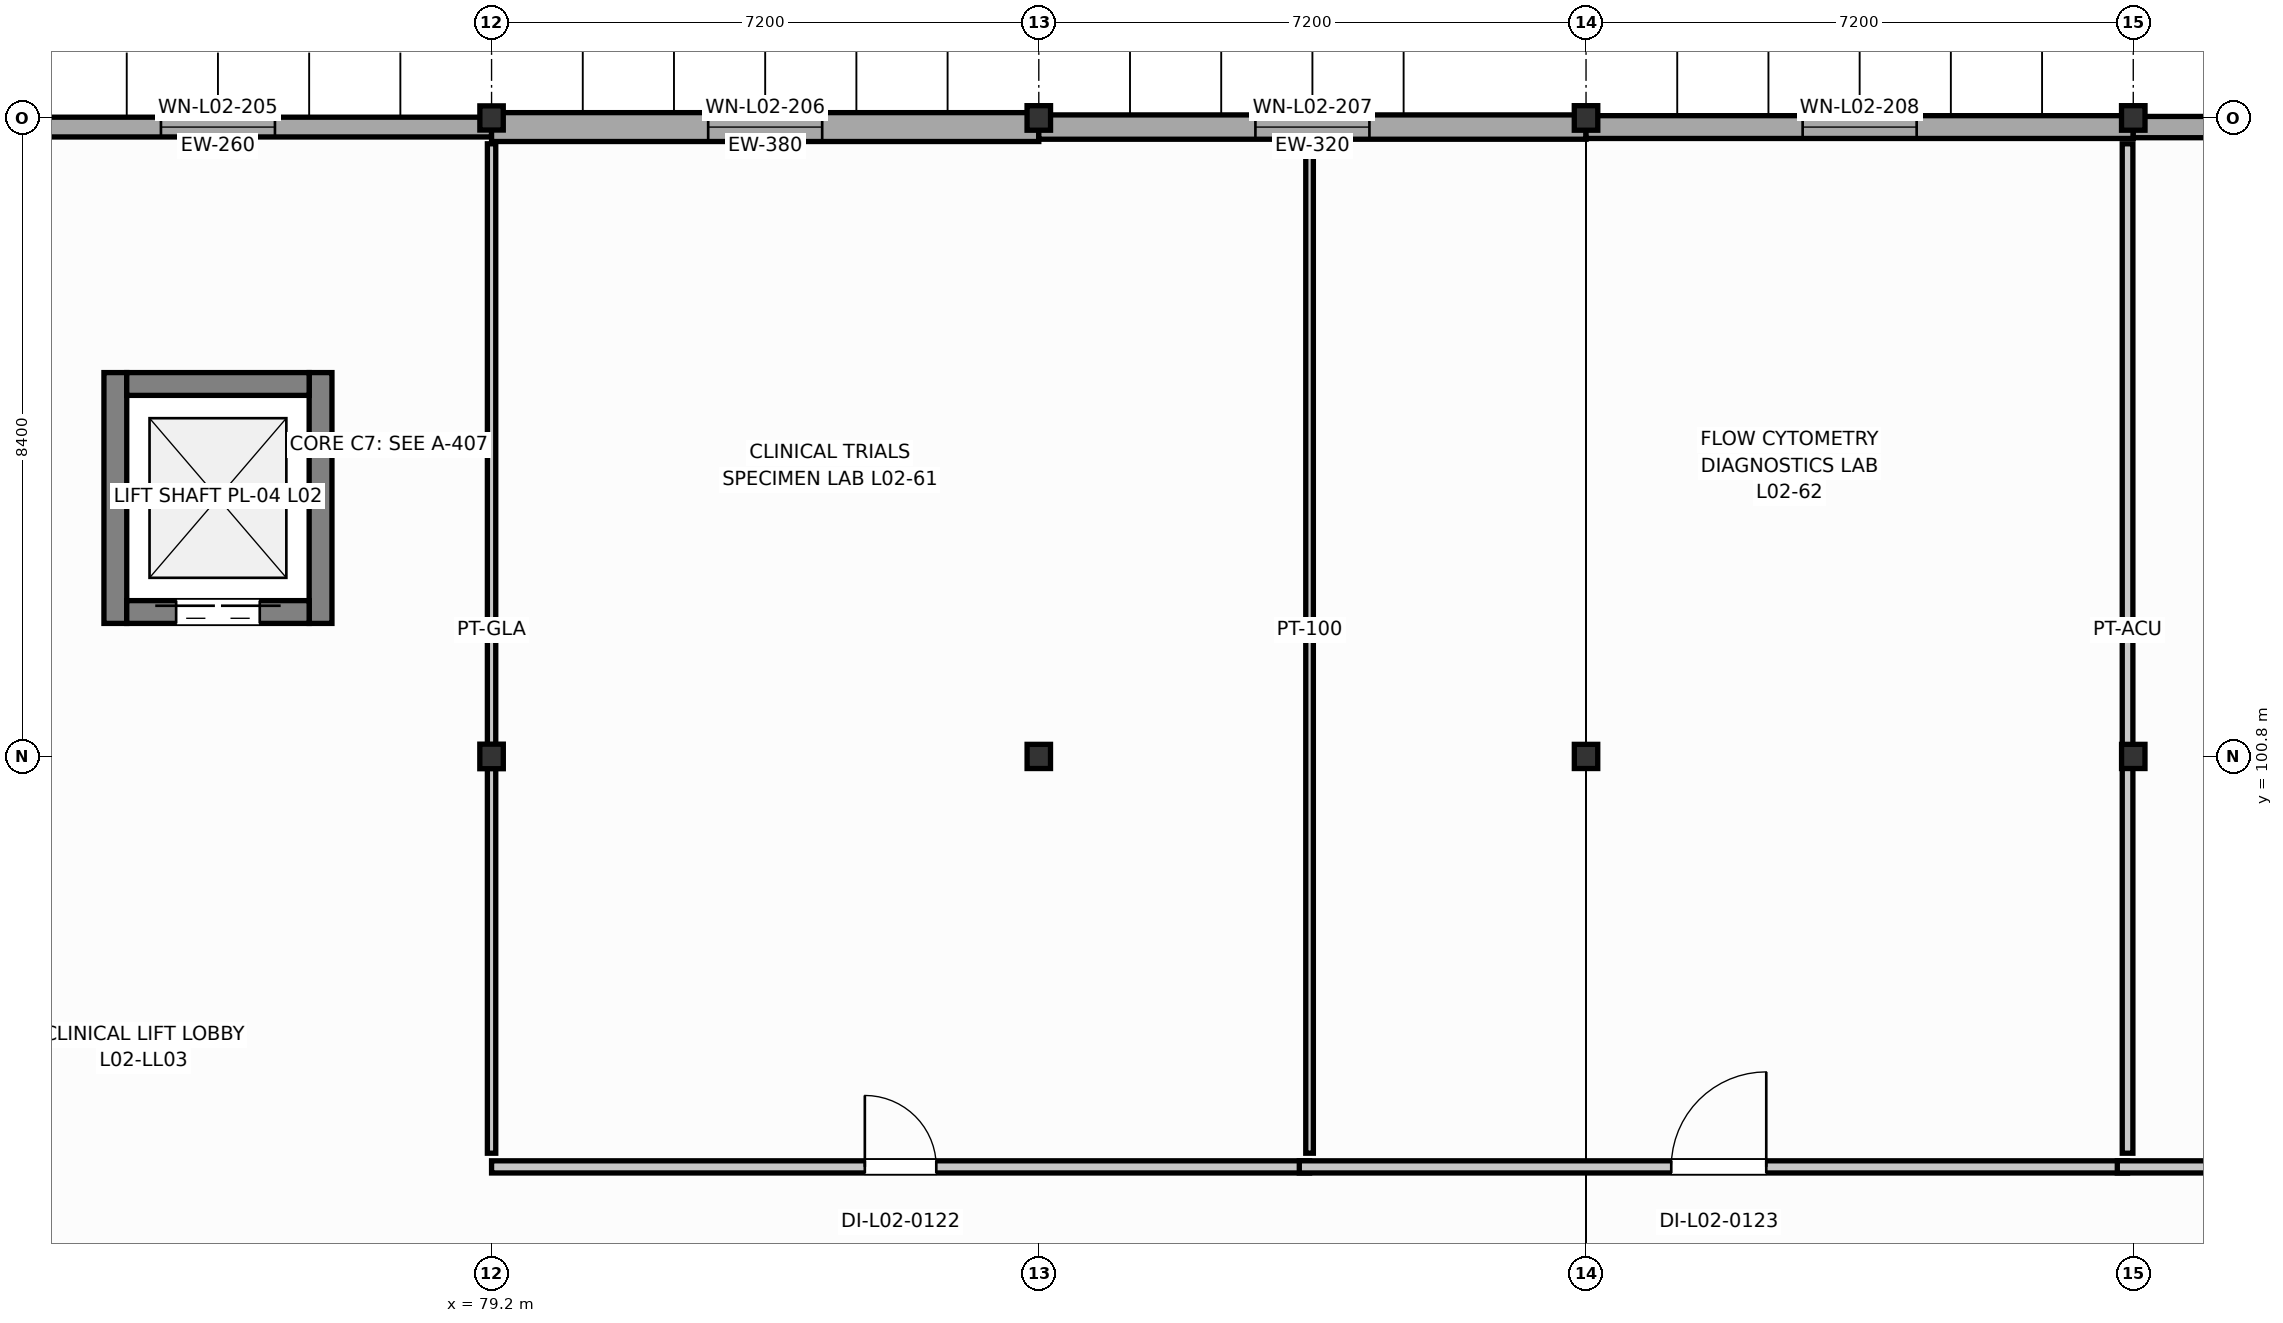
"""IFC4 building model, lengths in metres.
Left out: names, types, materials, properties, quantities, classifications, styles, units other than length and angle.
Written with IfcOpenShell. Run it as: python <this file> out.ifc"""

import sys

from ifc_helpers import new_model, si_unit, direction, frame, frame_2d, origin, origin_2d, place, context, subcontext, project, spatial, rectangle, i_section, extrude, element, fill, save


model = new_model("IFC4")
c1 = context("Model", 3, precision=1e-05, world=origin(), true_north=direction((0.0, 1.0)))
c2 = subcontext(c1, "Body", "Model", "MODEL_VIEW")
j1 = project(units=[si_unit("LENGTHUNIT", "METRE"), si_unit("PLANEANGLEUNIT", "RADIAN")], contexts=[c1])
p1 = place(None, origin())
s1 = spatial("IfcSite", under=j1, at=p1, CompositionType="ELEMENT")
p2 = place(p1, origin())
s2 = spatial("IfcBuilding", under=s1, at=p2, CompositionType="ELEMENT")
p3 = place(p2, frame((0.0, 0.0, 9.0)))
s3 = spatial("IfcBuildingStorey", under=s2, at=p3, CompositionType="ELEMENT", Elevation=9.0)
p4 = place(p3, frame((79.2, 100.8, 0.0), z_axis=(0.0, 0.0, 1.0), x_axis=(1.0, 0.0, 0.0)))
e1 = element("IfcColumn", 1, at=p4, inside=s3, PredefinedType="COLUMN", context=c2, shape_type="SweptSolid", body=[
    extrude(i_section(OverallWidth=0.309, OverallDepth=0.323, WebThickness=0.014, FlangeThickness=0.023, FilletRadius=0.016, at=origin_2d()), origin(), (0.0, 0.0, 1.0), 4.2),
])
for number, where, z_axis, x_axis in (
    (2, (79.2, 109.2, 0.0), (0.0, 0.0, 1.0), (1.0, 0.0, 0.0)),
    (3, (86.4, 100.8, 0.0), (0.0, 0.0, 1.0), (1.0, 0.0, 0.0)),
):
    element("IfcColumn", number, at=place(p3, frame(where, z_axis=z_axis, x_axis=x_axis)), inside=s3, PredefinedType="COLUMN", context=c2, shape_type="SweptSolid", body=[
        extrude(i_section(OverallWidth=0.308, OverallDepth=0.318, WebThickness=0.013, FlangeThickness=0.021, FilletRadius=0.016, at=origin_2d()), origin(), (0.0, 0.0, 1.0), 4.2),
    ])
p5 = place(p3, frame((86.4, 109.2, 0.0), z_axis=(0.0, 0.0, 1.0), x_axis=(1.0, 0.0, 0.0)))
e4 = element("IfcColumn", 4, at=p5, inside=s3, PredefinedType="COLUMN", context=c2, shape_type="SweptSolid", body=[
    extrude(i_section(OverallWidth=0.309, OverallDepth=0.323, WebThickness=0.014, FlangeThickness=0.023, FilletRadius=0.016, at=origin_2d()), origin(), (0.0, 0.0, 1.0), 4.2),
])
p6 = place(p3, frame((93.6, 100.8, 0.0), z_axis=(0.0, 0.0, 1.0), x_axis=(1.0, 0.0, 0.0)))
e5 = element("IfcColumn", 5, at=p6, inside=s3, PredefinedType="COLUMN", context=c2, shape_type="SweptSolid", body=[
    extrude(i_section(OverallWidth=0.308, OverallDepth=0.318, WebThickness=0.013, FlangeThickness=0.021, FilletRadius=0.016, at=origin_2d()), origin(), (0.0, 0.0, 1.0), 4.2),
])
p7 = place(p3, frame((93.6, 109.2, 0.0), z_axis=(0.0, 0.0, 1.0), x_axis=(1.0, 0.0, 0.0)))
e6 = element("IfcColumn", 6, at=p7, inside=s3, PredefinedType="COLUMN", context=c2, shape_type="SweptSolid", body=[
    extrude(i_section(OverallWidth=0.309, OverallDepth=0.323, WebThickness=0.014, FlangeThickness=0.023, FilletRadius=0.016, at=origin_2d()), origin(), (0.0, 0.0, 1.0), 4.2),
])
p8 = place(p3, frame((100.8, 100.8, 0.0), z_axis=(0.0, 0.0, 1.0), x_axis=(1.0, 0.0, 0.0)))
e7 = element("IfcColumn", 7, at=p8, inside=s3, PredefinedType="COLUMN", context=c2, shape_type="SweptSolid", body=[
    extrude(i_section(OverallWidth=0.308, OverallDepth=0.318, WebThickness=0.013, FlangeThickness=0.021, FilletRadius=0.016, at=origin_2d()), origin(), (0.0, 0.0, 1.0), 4.2),
])
p9 = place(p3, frame((100.8, 109.2, 0.0), z_axis=(0.0, 0.0, 1.0), x_axis=(1.0, 0.0, 0.0)))
e8 = element("IfcColumn", 8, at=p9, inside=s3, PredefinedType="COLUMN", context=c2, shape_type="SweptSolid", body=[
    extrude(i_section(OverallWidth=0.309, OverallDepth=0.323, WebThickness=0.014, FlangeThickness=0.023, FilletRadius=0.016, at=origin_2d()), origin(), (0.0, 0.0, 1.0), 4.2),
])
for number, where, z_axis, x_axis in (
    (9, (74.25, 102.55, 0.0), (0.0, 0.0, 1.0), (0.0, 1.0, 0.0)),
    (10, (76.95, 102.55, 0.0), (0.0, 0.0, 1.0), (0.0, 1.0, 0.0)),
):
    element("IfcWall", number, at=place(p3, frame(where, z_axis=z_axis, x_axis=x_axis)), inside=s3, PredefinedType="SHEAR", context=c2, shape_type="SweptSolid", body=[
        extrude(rectangle(XDim=3.3, YDim=0.3, at=frame_2d((1.65, 0.0))), origin(), (0.0, 0.0, 1.0), 3.97),
    ])
p10 = place(p3, frame((74.4, 105.7, 0.0), z_axis=(0.0, 0.0, 1.0), x_axis=(1.0, 0.0, 0.0)))
e11 = element("IfcWall", 11, at=p10, inside=s3, PredefinedType="SHEAR", context=c2, shape_type="SweptSolid", body=[
    extrude(rectangle(XDim=2.4, YDim=0.3, at=frame_2d((1.2, 0.0))), origin(), (0.0, 0.0, 1.0), 3.97),
])
p11 = place(p3, frame((74.4, 102.7, 0.0), z_axis=(0.0, 0.0, 1.0), x_axis=(1.0, 0.0, 0.0)))
e12 = element("IfcWall", 12, at=p11, inside=s3, PredefinedType="SHEAR", context=c2, shape_type="SweptSolid", body=[
    extrude(rectangle(XDim=2.4, YDim=0.3, at=frame_2d((1.2, 0.0))), origin(), (0.0, 0.0, 1.0), 3.97),
])
p12 = place(p11, frame((0.65, 0.0, 0.0)))
e13 = element("IfcOpeningElement", 13, at=p12, cuts=e12, PredefinedType="OPENING", context=c2, shape_type="SweptSolid", body=[
    extrude(rectangle(XDim=1.1, YDim=2.15, at=frame_2d((0.55, 1.075))), frame((0.0, 0.16, 0.0), z_axis=(0.0, -1.0, 0.0), x_axis=(1.0, 0.0, 0.0)), (0.0, 0.0, 1.0), 0.32),
])
p13 = place(p3, frame((72.0, 109.08, 0.0), z_axis=(0.0, 0.0, 1.0), x_axis=(1.0, 0.0, 0.0)))
e14 = element("IfcWall", 14, at=p13, inside=s3, PredefinedType="SOLIDWALL", context=c2, shape_type="SweptSolid", body=[
    extrude(rectangle(XDim=7.2, YDim=0.26, at=frame_2d((3.6, 0.0))), origin(), (0.0, 0.0, 1.0), 3.482),
])
p14 = place(p13, frame((2.85, 0.0, 0.95)))
e15 = element("IfcOpeningElement", 15, at=p14, cuts=e14, PredefinedType="OPENING", context=c2, shape_type="SweptSolid", body=[
    extrude(rectangle(XDim=1.5, YDim=1.15, at=frame_2d((0.75, 0.575))), frame((0.0, 0.14, 0.0), z_axis=(0.0, -1.0, 0.0), x_axis=(1.0, 0.0, 0.0)), (0.0, 0.0, 1.0), 0.28),
])
p15 = place(p3, frame((79.2, 109.08, 0.0), z_axis=(0.0, 0.0, 1.0), x_axis=(1.0, 0.0, 0.0)))
e16 = element("IfcWall", 16, at=p15, inside=s3, PredefinedType="SOLIDWALL", context=c2, shape_type="SweptSolid", body=[
    extrude(rectangle(XDim=7.2, YDim=0.38, at=frame_2d((3.6, 0.0))), origin(), (0.0, 0.0, 1.0), 3.482),
])
p16 = place(p15, frame((2.85, 0.0, 0.95)))
e17 = element("IfcOpeningElement", 17, at=p16, cuts=e16, PredefinedType="OPENING", context=c2, shape_type="SweptSolid", body=[
    extrude(rectangle(XDim=1.5, YDim=1.35, at=frame_2d((0.75, 0.675))), frame((0.0, 0.2, 0.0), z_axis=(0.0, -1.0, 0.0), x_axis=(1.0, 0.0, 0.0)), (0.0, 0.0, 1.0), 0.4),
])
p17 = place(p3, frame((86.4, 109.08, 0.0), z_axis=(0.0, 0.0, 1.0), x_axis=(1.0, 0.0, 0.0)))
e18 = element("IfcWall", 18, at=p17, inside=s3, PredefinedType="SOLIDWALL", context=c2, shape_type="SweptSolid", body=[
    extrude(rectangle(XDim=7.2, YDim=0.32, at=frame_2d((3.6, 0.0))), origin(), (0.0, 0.0, 1.0), 3.482),
])
p18 = place(p17, frame((2.85, 0.0, 0.95)))
e19 = element("IfcOpeningElement", 19, at=p18, cuts=e18, PredefinedType="OPENING", context=c2, shape_type="SweptSolid", body=[
    extrude(rectangle(XDim=1.5, YDim=1.55, at=frame_2d((0.75, 0.775))), frame((0.0, 0.17, 0.0), z_axis=(0.0, -1.0, 0.0), x_axis=(1.0, 0.0, 0.0)), (0.0, 0.0, 1.0), 0.34),
])
p19 = place(p3, frame((93.6, 109.08, 0.0), z_axis=(0.0, 0.0, 1.0), x_axis=(1.0, 0.0, 0.0)))
e20 = element("IfcWall", 20, at=p19, inside=s3, PredefinedType="SOLIDWALL", context=c2, shape_type="SweptSolid", body=[
    extrude(rectangle(XDim=7.2, YDim=0.3, at=frame_2d((3.6, 0.0))), origin(), (0.0, 0.0, 1.0), 3.482),
])
p20 = place(p19, frame((2.85, 0.0, 0.95)))
e21 = element("IfcOpeningElement", 21, at=p20, cuts=e20, PredefinedType="OPENING", context=c2, shape_type="SweptSolid", body=[
    extrude(rectangle(XDim=1.5, YDim=1.75, at=frame_2d((0.75, 0.875))), frame((0.0, 0.16, 0.0), z_axis=(0.0, -1.0, 0.0), x_axis=(1.0, 0.0, 0.0)), (0.0, 0.0, 1.0), 0.32),
])
p21 = place(p3, frame((100.8, 109.08, 0.0), z_axis=(0.0, 0.0, 1.0), x_axis=(1.0, 0.0, 0.0)))
e22 = element("IfcWall", 22, at=p21, inside=s3, PredefinedType="SOLIDWALL", context=c2, shape_type="SweptSolid", body=[
    extrude(rectangle(XDim=7.2, YDim=0.28, at=frame_2d((3.6, 0.0))), origin(), (0.0, 0.0, 1.0), 3.482),
])
p22 = place(p21, frame((2.775, 0.0, 0.95)))
e23 = element("IfcOpeningElement", 23, at=p22, cuts=e22, PredefinedType="OPENING", context=c2, shape_type="SweptSolid", body=[
    extrude(rectangle(XDim=1.65, YDim=1.15, at=frame_2d((0.825, 0.575))), frame((0.0, 0.15, 0.0), z_axis=(0.0, -1.0, 0.0), x_axis=(1.0, 0.0, 0.0)), (0.0, 0.0, 1.0), 0.3),
])
p23 = place(p3, frame((89.962, 95.4, 0.0), z_axis=(0.0, 0.0, 1.0), x_axis=(-1.0, 0.0, 0.0)))
e24 = element("IfcWall", 24, at=p23, inside=s3, PredefinedType="PARTITIONING", context=c2, shape_type="SweptSolid", body=[
    extrude(rectangle(XDim=10.762, YDim=0.16, at=frame_2d((5.381, 0.0))), origin(), (0.0, 0.0, 1.0), 3.252),
])
p24 = place(p23, frame((4.911, 0.0, 0.0)))
e25 = element("IfcOpeningElement", 25, at=p24, cuts=e24, PredefinedType="OPENING", context=c2, shape_type="SweptSolid", body=[
    extrude(rectangle(XDim=0.94, YDim=2.05, at=frame_2d((0.47, 1.025))), frame((0.0, 0.09, 0.0), z_axis=(0.0, -1.0, 0.0), x_axis=(1.0, 0.0, 0.0)), (0.0, 0.0, 1.0), 0.18),
])
p25 = place(p3, frame((79.2, 95.58, 0.0), z_axis=(0.0, 0.0, 1.0), x_axis=(0.0, 1.0, 0.0)))
e26 = element("IfcWall", 26, at=p25, inside=s3, PredefinedType="MOVABLE", context=c2, shape_type="SweptSolid", body=[
    extrude(rectangle(XDim=13.28, YDim=0.11, at=frame_2d((6.64, 0.0))), origin(), (0.0, 0.0, 1.0), 3.252),
])
p26 = place(p3, frame((89.962, 108.86, 0.0), z_axis=(0.0, 0.0, 1.0), x_axis=(0.0, -1.0, 0.0)))
e27 = element("IfcWall", 27, at=p26, inside=s3, PredefinedType="PARTITIONING", context=c2, shape_type="SweptSolid", body=[
    extrude(rectangle(XDim=13.28, YDim=0.1, at=frame_2d((6.64, 0.0))), origin(), (0.0, 0.0, 1.0), 3.485),
])
p27 = place(p3, frame((100.725, 95.4, 0.0), z_axis=(0.0, 0.0, 1.0), x_axis=(-1.0, 0.0, 0.0)))
e28 = element("IfcWall", 28, at=p27, inside=s3, PredefinedType="PARTITIONING", context=c2, shape_type="SweptSolid", body=[
    extrude(rectangle(XDim=10.898, YDim=0.16, at=frame_2d((5.449, 0.0))), origin(), (0.0, 0.0, 1.0), 3.328),
])
p28 = place(p27, frame((4.754, 0.0, 0.0)))
e29 = element("IfcOpeningElement", 29, at=p28, cuts=e28, PredefinedType="OPENING", context=c2, shape_type="SweptSolid", body=[
    extrude(rectangle(XDim=1.25, YDim=2.15, at=frame_2d((0.625, 1.075))), frame((0.0, 0.09, 0.0), z_axis=(0.0, -1.0, 0.0), x_axis=(1.0, 0.0, 0.0)), (0.0, 0.0, 1.0), 0.18),
])
p29 = place(p3, frame((100.725, 108.86, 0.0), z_axis=(0.0, 0.0, 1.0), x_axis=(0.0, -1.0, 0.0)))
e30 = element("IfcWall", 30, at=p29, inside=s3, PredefinedType="PARTITIONING", context=c2, shape_type="SweptSolid", body=[
    extrude(rectangle(XDim=13.28, YDim=0.14, at=frame_2d((6.64, 0.0))), origin(), (0.0, 0.0, 1.0), 3.252),
])
p30 = place(p3, frame((111.488, 95.4, 0.0), z_axis=(0.0, 0.0, 1.0), x_axis=(-1.0, 0.0, 0.0)))
e31 = element("IfcWall", 31, at=p30, inside=s3, PredefinedType="PARTITIONING", context=c2, shape_type="SweptSolid", body=[
    extrude(rectangle(XDim=10.897, YDim=0.16, at=frame_2d((5.449, 0.0))), origin(), (0.0, 0.0, 1.0), 3.252),
])
p31 = place(p30, frame((4.729, 0.0, 0.0)))
e32 = element("IfcOpeningElement", 32, at=p31, cuts=e31, PredefinedType="OPENING", context=c2, shape_type="SweptSolid", body=[
    extrude(rectangle(XDim=1.3, YDim=2.15, at=frame_2d((0.65, 1.075))), frame((0.0, 0.09, 0.0), z_axis=(0.0, -1.0, 0.0), x_axis=(1.0, 0.0, 0.0)), (0.0, 0.0, 1.0), 0.18),
])
p32 = place(p12, origin())
e33 = element("IfcDoor", 33, at=p32, inside=s3, OperationType="DOUBLE_DOOR_SLIDING", PredefinedType="DOOR", context=c2, shape_type="SweptSolid", body=[
    extrude(rectangle(XDim=1.1, YDim=2.15, at=frame_2d((0.55, 1.075))), frame((0.0, 0.025, 0.0), z_axis=(0.0, -1.0, 0.0), x_axis=(1.0, 0.0, 0.0)), (0.0, 0.0, 1.0), 0.05),
])
fill(e13, e33)
p33 = place(p14, origin())
e34 = element("IfcWindow", 34, at=p33, inside=s3, PartitioningType="SINGLE_PANEL", PredefinedType="WINDOW", context=c2, shape_type="SweptSolid", body=[
    extrude(rectangle(XDim=1.5, YDim=1.15, at=frame_2d((0.75, 0.575))), frame((0.0, 0.03, 0.0), z_axis=(0.0, -1.0, 0.0), x_axis=(1.0, 0.0, 0.0)), (0.0, 0.0, 1.0), 0.06),
])
fill(e15, e34)
p34 = place(p16, origin())
e35 = element("IfcWindow", 35, at=p34, inside=s3, PartitioningType="SINGLE_PANEL", PredefinedType="WINDOW", context=c2, shape_type="SweptSolid", body=[
    extrude(rectangle(XDim=1.5, YDim=1.35, at=frame_2d((0.75, 0.675))), frame((0.0, 0.03, 0.0), z_axis=(0.0, -1.0, 0.0), x_axis=(1.0, 0.0, 0.0)), (0.0, 0.0, 1.0), 0.06),
])
fill(e17, e35)
p35 = place(p18, origin())
e36 = element("IfcWindow", 36, at=p35, inside=s3, PartitioningType="SINGLE_PANEL", PredefinedType="WINDOW", context=c2, shape_type="SweptSolid", body=[
    extrude(rectangle(XDim=1.5, YDim=1.55, at=frame_2d((0.75, 0.775))), frame((0.0, 0.03, 0.0), z_axis=(0.0, -1.0, 0.0), x_axis=(1.0, 0.0, 0.0)), (0.0, 0.0, 1.0), 0.06),
])
fill(e19, e36)
p36 = place(p20, origin())
e37 = element("IfcWindow", 37, at=p36, inside=s3, PartitioningType="SINGLE_PANEL", PredefinedType="WINDOW", context=c2, shape_type="SweptSolid", body=[
    extrude(rectangle(XDim=1.5, YDim=1.75, at=frame_2d((0.75, 0.875))), frame((0.0, 0.03, 0.0), z_axis=(0.0, -1.0, 0.0), x_axis=(1.0, 0.0, 0.0)), (0.0, 0.0, 1.0), 0.06),
])
fill(e21, e37)
p37 = place(p24, frame((0.94, 0.0, 0.0), z_axis=(0.0, 0.0, 1.0), x_axis=(-1.0, 0.0, 0.0)))
e38 = element("IfcDoor", 38, at=p37, inside=s3, OperationType="SINGLE_SWING_LEFT", PredefinedType="DOOR", context=c2, shape_type="SweptSolid", body=[
    extrude(rectangle(XDim=0.94, YDim=2.05, at=frame_2d((0.47, 1.025))), frame((0.0, 0.025, 0.0), z_axis=(0.0, -1.0, 0.0), x_axis=(1.0, 0.0, 0.0)), (0.0, 0.0, 1.0), 0.05),
])
fill(e25, e38)
p38 = place(p28, frame((1.25, 0.0, 0.0), z_axis=(0.0, 0.0, 1.0), x_axis=(-1.0, 0.0, 0.0)))
e39 = element("IfcDoor", 39, at=p38, inside=s3, OperationType="SINGLE_SWING_RIGHT", PredefinedType="DOOR", context=c2, shape_type="SweptSolid", body=[
    extrude(rectangle(XDim=1.25, YDim=2.15, at=frame_2d((0.625, 1.075))), frame((0.0, 0.025, 0.0), z_axis=(0.0, -1.0, 0.0), x_axis=(1.0, 0.0, 0.0)), (0.0, 0.0, 1.0), 0.05),
])
fill(e29, e39)
save(model, sys.argv[1])
